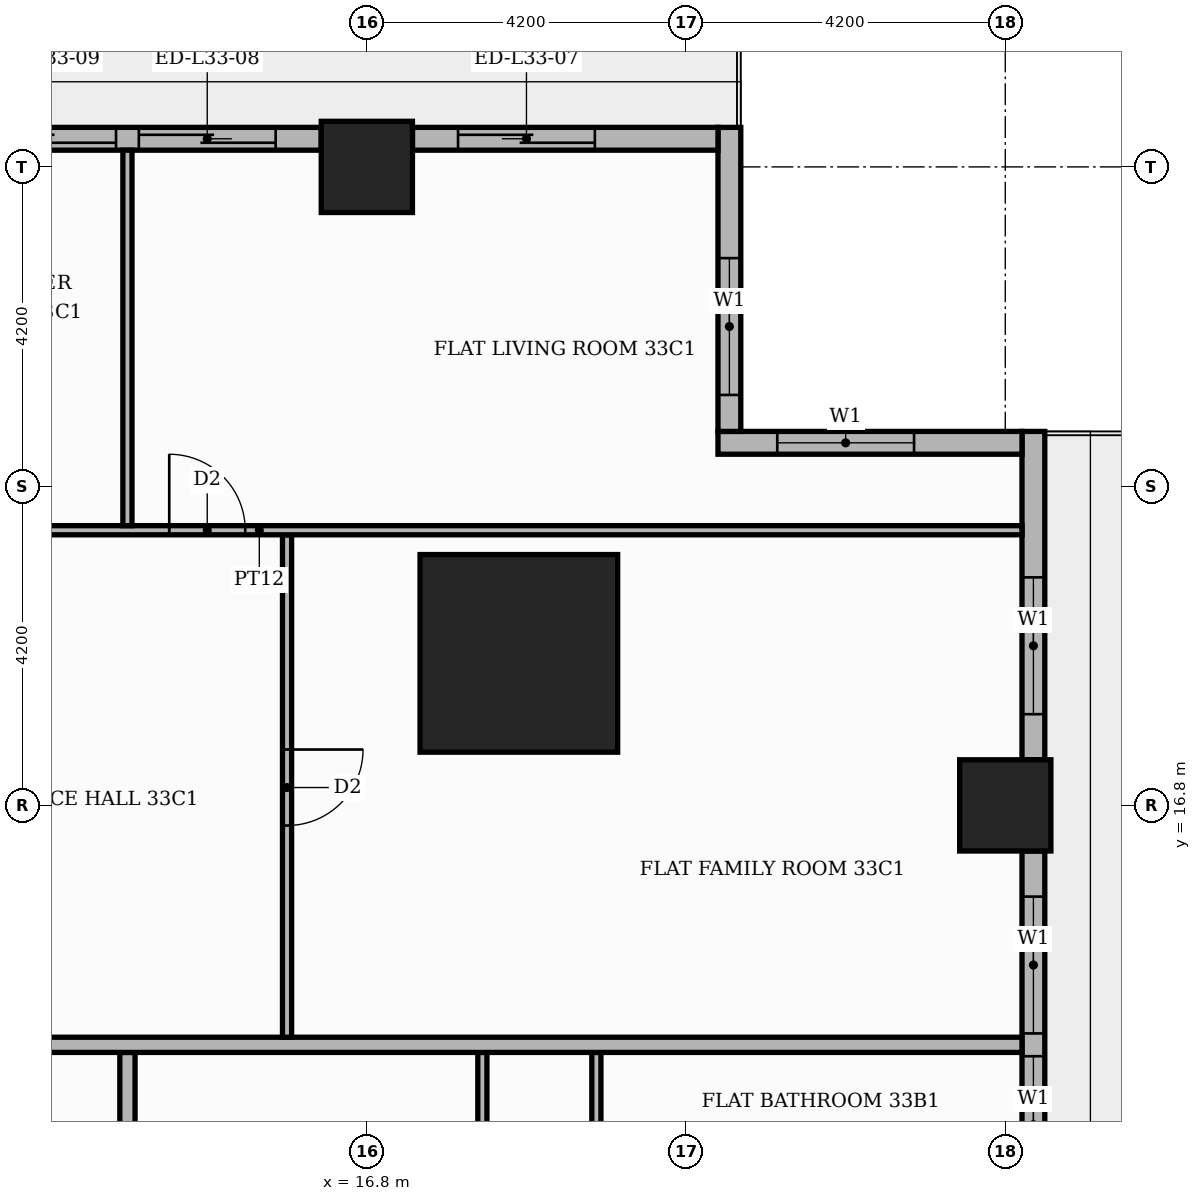
"""IFC4 building model, lengths in metres.
Left out: names, types, materials, properties, quantities, classifications, styles, units other than length and angle.
Written with IfcOpenShell. Run it as: python <this file> out.ifc"""

import sys

from ifc_helpers import new_model, si_unit, direction, frame, frame_2d, origin, origin_2d, place, context, subcontext, project, spatial, rectangle, extrude, element, fill, save


model = new_model("IFC4")
c1 = context("Model", 3, precision=1e-05, world=origin(), true_north=direction((0.0, 1.0)))
c2 = subcontext(c1, "Body", "Model", "MODEL_VIEW")
j1 = project(units=[si_unit("LENGTHUNIT", "METRE"), si_unit("PLANEANGLEUNIT", "RADIAN")], contexts=[c1])
p1 = place(None, origin())
s1 = spatial("IfcSite", under=j1, at=p1, CompositionType="ELEMENT")
p2 = place(p1, origin())
s2 = spatial("IfcBuilding", under=s1, at=p2, CompositionType="ELEMENT")
p3 = place(p2, frame((0.0, 0.0, 141.6)))
s3 = spatial("IfcBuildingStorey", under=s2, at=p3, CompositionType="ELEMENT", Elevation=141.6)
p4 = place(p3, frame((18.8, 18.8, 0.0), z_axis=(0.0, 0.0, 1.0), x_axis=(1.0, 0.0, 0.0)))
e1 = element("IfcColumn", 1, at=p4, inside=s3, PredefinedType="COLUMN", context=c2, shape_type="SweptSolid", body=[
    extrude(rectangle(XDim=2.6, YDim=2.6, at=origin_2d()), origin(), (0.0, 0.0, 1.0), 3.9),
])
for number, where, z_axis, x_axis in (
    (2, (25.2, 16.8, 0.0), (0.0, 0.0, 1.0), (1.0, 0.0, 0.0)),
    (3, (16.8, 25.2, 0.0), (0.0, 0.0, 1.0), (1.0, 0.0, 0.0)),
):
    element("IfcColumn", number, at=place(p3, frame(where, z_axis=z_axis, x_axis=x_axis)), inside=s3, PredefinedType="COLUMN", context=c2, shape_type="SweptSolid", body=[
        extrude(rectangle(XDim=1.2, YDim=1.2, at=origin_2d()), origin(), (0.0, 0.0, 1.0), 3.9),
    ])
p5 = place(p3, frame((25.57, 9.0, 0.0), z_axis=(0.0, 0.0, 1.0), x_axis=(0.0, 1.0, 0.0)))
e4 = element("IfcWall", 4, at=p5, inside=s3, PredefinedType="STANDARD", context=c2, shape_type="SweptSolid", body=[
    extrude(rectangle(XDim=7.2, YDim=0.3, at=frame_2d((3.6, 0.0))), origin(), (0.0, 0.0, 1.0), 3.48),
])
p6 = place(p5, frame((0.6, 0.0, 0.9)))
e5 = element("IfcOpeningElement", 5, at=p6, cuts=e4, PredefinedType="OPENING", context=c2, shape_type="SweptSolid", body=[
    extrude(rectangle(XDim=1.8, YDim=2.1, at=frame_2d((0.9, 1.05))), frame((0.0, 0.16, 0.0), z_axis=(0.0, -1.0, 0.0), x_axis=(1.0, 0.0, 0.0)), (0.0, 0.0, 1.0), 0.32),
])
p7 = place(p5, frame((2.7, 0.0, 0.9)))
e6 = element("IfcOpeningElement", 6, at=p7, cuts=e4, PredefinedType="OPENING", context=c2, shape_type="SweptSolid", body=[
    extrude(rectangle(XDim=1.8, YDim=2.1, at=frame_2d((0.9, 1.05))), frame((0.0, 0.16, 0.0), z_axis=(0.0, -1.0, 0.0), x_axis=(1.0, 0.0, 0.0)), (0.0, 0.0, 1.0), 0.32),
])
p8 = place(p5, frame((4.8, 0.0, 0.9)))
e7 = element("IfcOpeningElement", 7, at=p8, cuts=e4, PredefinedType="OPENING", context=c2, shape_type="SweptSolid", body=[
    extrude(rectangle(XDim=1.8, YDim=2.1, at=frame_2d((0.9, 1.05))), frame((0.0, 0.16, 0.0), z_axis=(0.0, -1.0, 0.0), x_axis=(1.0, 0.0, 0.0)), (0.0, 0.0, 1.0), 0.32),
])
p9 = place(p3, frame((25.57, 17.4, 0.0), z_axis=(0.0, 0.0, 1.0), x_axis=(0.0, 1.0, 0.0)))
e8 = element("IfcWall", 8, at=p9, inside=s3, PredefinedType="STANDARD", context=c2, shape_type="SweptSolid", body=[
    extrude(rectangle(XDim=4.32, YDim=0.3, at=frame_2d((2.16, 0.0))), origin(), (0.0, 0.0, 1.0), 3.48),
])
p10 = place(p9, frame((0.6, 0.0, 0.9)))
e9 = element("IfcOpeningElement", 9, at=p10, cuts=e8, PredefinedType="OPENING", context=c2, shape_type="SweptSolid", body=[
    extrude(rectangle(XDim=1.8, YDim=2.1, at=frame_2d((0.9, 1.05))), frame((0.0, 0.16, 0.0), z_axis=(0.0, -1.0, 0.0), x_axis=(1.0, 0.0, 0.0)), (0.0, 0.0, 1.0), 0.32),
])
p11 = place(p3, frame((25.42, 21.57, 0.0), z_axis=(0.0, 0.0, 1.0), x_axis=(-1.0, 0.0, 0.0)))
e10 = element("IfcWall", 10, at=p11, inside=s3, PredefinedType="STANDARD", context=c2, shape_type="SweptSolid", body=[
    extrude(rectangle(XDim=4.0, YDim=0.3, at=frame_2d((2.0, 0.0))), origin(), (0.0, 0.0, 1.0), 3.48),
])
p12 = place(p11, frame((1.42, 0.0, 0.9)))
e11 = element("IfcOpeningElement", 11, at=p12, cuts=e10, PredefinedType="OPENING", context=c2, shape_type="SweptSolid", body=[
    extrude(rectangle(XDim=1.8, YDim=2.1, at=frame_2d((0.9, 1.05))), frame((0.0, 0.16, 0.0), z_axis=(0.0, -1.0, 0.0), x_axis=(1.0, 0.0, 0.0)), (0.0, 0.0, 1.0), 0.32),
])
p13 = place(p3, frame((21.57, 21.72, 0.0), z_axis=(0.0, 0.0, 1.0), x_axis=(0.0, 1.0, 0.0)))
e12 = element("IfcWall", 12, at=p13, inside=s3, PredefinedType="STANDARD", context=c2, shape_type="SweptSolid", body=[
    extrude(rectangle(XDim=4.0, YDim=0.3, at=frame_2d((2.0, 0.0))), origin(), (0.0, 0.0, 1.0), 3.48),
])
p14 = place(p13, frame((0.48, 0.0, 0.9)))
e13 = element("IfcOpeningElement", 13, at=p14, cuts=e12, PredefinedType="OPENING", context=c2, shape_type="SweptSolid", body=[
    extrude(rectangle(XDim=1.8, YDim=2.1, at=frame_2d((0.9, 1.05))), frame((0.0, 0.16, 0.0), z_axis=(0.0, -1.0, 0.0), x_axis=(1.0, 0.0, 0.0)), (0.0, 0.0, 1.0), 0.32),
])
p15 = place(p3, frame((21.42, 25.57, 0.0), z_axis=(0.0, 0.0, 1.0), x_axis=(-1.0, 0.0, 0.0)))
e14 = element("IfcWall", 14, at=p15, inside=s3, PredefinedType="STANDARD", context=c2, shape_type="SweptSolid", body=[
    extrude(rectangle(XDim=4.02, YDim=0.3, at=frame_2d((2.01, 0.0))), origin(), (0.0, 0.0, 1.0), 3.48),
])
p16 = place(p15, frame((1.62, 0.0, 0.0)))
e15 = element("IfcOpeningElement", 15, at=p16, cuts=e14, PredefinedType="OPENING", context=c2, shape_type="SweptSolid", body=[
    extrude(rectangle(XDim=1.8, YDim=2.4, at=frame_2d((0.9, 1.2))), frame((0.0, 0.16, 0.0), z_axis=(0.0, -1.0, 0.0), x_axis=(1.0, 0.0, 0.0)), (0.0, 0.0, 1.0), 0.32),
])
p17 = place(p3, frame((16.2, 25.57, 0.0), z_axis=(0.0, 0.0, 1.0), x_axis=(-1.0, 0.0, 0.0)))
e16 = element("IfcWall", 16, at=p17, inside=s3, PredefinedType="STANDARD", context=c2, shape_type="SweptSolid", body=[
    extrude(rectangle(XDim=7.2, YDim=0.3, at=frame_2d((3.6, 0.0))), origin(), (0.0, 0.0, 1.0), 3.48),
])
p18 = place(p17, frame((0.6, 0.0, 0.0)))
e17 = element("IfcOpeningElement", 17, at=p18, cuts=e16, PredefinedType="OPENING", context=c2, shape_type="SweptSolid", body=[
    extrude(rectangle(XDim=1.8, YDim=2.4, at=frame_2d((0.9, 1.2))), frame((0.0, 0.16, 0.0), z_axis=(0.0, -1.0, 0.0), x_axis=(1.0, 0.0, 0.0)), (0.0, 0.0, 1.0), 0.32),
])
p19 = place(p17, frame((2.7, 0.0, 0.0)))
e18 = element("IfcOpeningElement", 18, at=p19, cuts=e16, PredefinedType="OPENING", context=c2, shape_type="SweptSolid", body=[
    extrude(rectangle(XDim=1.8, YDim=2.4, at=frame_2d((0.9, 1.2))), frame((0.0, 0.16, 0.0), z_axis=(0.0, -1.0, 0.0), x_axis=(1.0, 0.0, 0.0)), (0.0, 0.0, 1.0), 0.32),
])
p20 = place(p17, frame((4.8, 0.0, 0.9)))
e19 = element("IfcOpeningElement", 19, at=p20, cuts=e16, PredefinedType="OPENING", context=c2, shape_type="SweptSolid", body=[
    extrude(rectangle(XDim=1.8, YDim=2.1, at=frame_2d((0.9, 1.05))), frame((0.0, 0.16, 0.0), z_axis=(0.0, -1.0, 0.0), x_axis=(1.0, 0.0, 0.0)), (0.0, 0.0, 1.0), 0.32),
])
p21 = place(p3, frame((18.32, 9.66, 0.0), z_axis=(0.0, 0.0, 1.0), x_axis=(0.0, 1.0, 0.0)))
e20 = element("IfcWall", 20, at=p21, inside=s3, PredefinedType="PARTITIONING", context=c2, shape_type="SweptSolid", body=[
    extrude(rectangle(XDim=3.89, YDim=0.12, at=frame_2d((1.945, 0.0))), origin(), (0.0, 0.0, 1.0), 3.48),
])
p22 = place(p21, frame((1.515, 0.0, 0.0)))
e21 = element("IfcOpeningElement", 21, at=p22, cuts=e20, PredefinedType="OPENING", context=c2, shape_type="SweptSolid", body=[
    extrude(rectangle(XDim=0.9, YDim=2.1, at=frame_2d((0.45, 1.05))), frame((0.0, 0.07, 0.0), z_axis=(0.0, -1.0, 0.0), x_axis=(1.0, 0.0, 0.0)), (0.0, 0.0, 1.0), 0.14),
])
p23 = place(p3, frame((13.65, 11.1, 0.0), z_axis=(0.0, 0.0, 1.0), x_axis=(0.0, 1.0, 0.0)))
e22 = element("IfcWall", 22, at=p23, inside=s3, PredefinedType="PARTITIONING", context=c2, shape_type="SweptSolid", body=[
    extrude(rectangle(XDim=2.45, YDim=0.2, at=frame_2d((1.225, 0.0))), origin(), (0.0, 0.0, 1.0), 3.48),
])
p24 = place(p3, frame((19.82, 11.61, 0.0), z_axis=(0.0, 0.0, 1.0), x_axis=(0.0, 1.0, 0.0)))
e23 = element("IfcWall", 23, at=p24, inside=s3, PredefinedType="PARTITIONING", context=c2, shape_type="SweptSolid", body=[
    extrude(rectangle(XDim=1.94, YDim=0.12, at=frame_2d((0.97, 0.0))), origin(), (0.0, 0.0, 1.0), 3.48),
])
p25 = place(p3, frame((-13.65, 13.65, 0.0), z_axis=(0.0, 0.0, 1.0), x_axis=(1.0, 0.0, 0.0)))
e24 = element("IfcWall", 24, at=p25, inside=s3, PredefinedType="PARTITIONING", context=c2, shape_type="SweptSolid", body=[
    extrude(rectangle(XDim=39.07, YDim=0.2, at=frame_2d((19.535, 0.0))), origin(), (0.0, 0.0, 1.0), 3.48),
])
p26 = place(p25, frame((24.65, 0.0, 0.0)))
e25 = element("IfcOpeningElement", 25, at=p26, cuts=e24, PredefinedType="OPENING", context=c2, shape_type="SweptSolid", body=[
    extrude(rectangle(XDim=1.1, YDim=2.4, at=frame_2d((0.55, 1.2))), frame((0.0, 0.11, 0.0), z_axis=(0.0, -1.0, 0.0), x_axis=(1.0, 0.0, 0.0)), (0.0, 0.0, 1.0), 0.22),
])
p27 = place(p25, frame((12.05, 0.0, 0.0)))
e26 = element("IfcOpeningElement", 26, at=p27, cuts=e24, PredefinedType="OPENING", context=c2, shape_type="SweptSolid", body=[
    extrude(rectangle(XDim=1.1, YDim=2.4, at=frame_2d((0.55, 1.2))), frame((0.0, 0.11, 0.0), z_axis=(0.0, -1.0, 0.0), x_axis=(1.0, 0.0, 0.0)), (0.0, 0.0, 1.0), 0.22),
])
p28 = place(p3, frame((15.75, 13.75, 0.0), z_axis=(0.0, 0.0, 1.0), x_axis=(0.0, 1.0, 0.0)))
e27 = element("IfcWall", 27, at=p28, inside=s3, PredefinedType="PARTITIONING", context=c2, shape_type="SweptSolid", body=[
    extrude(rectangle(XDim=6.61, YDim=0.12, at=frame_2d((3.305, 0.0))), origin(), (0.0, 0.0, 1.0), 3.48),
])
p29 = place(p28, frame((2.785, 0.0, 0.0)))
e28 = element("IfcOpeningElement", 28, at=p29, cuts=e27, PredefinedType="OPENING", context=c2, shape_type="SweptSolid", body=[
    extrude(rectangle(XDim=1.0, YDim=2.1, at=frame_2d((0.5, 1.05))), frame((0.0, 0.07, 0.0), z_axis=(0.0, -1.0, 0.0), x_axis=(1.0, 0.0, 0.0)), (0.0, 0.0, 1.0), 0.14),
])
p30 = place(p3, frame((5.35, 20.42, 0.0), z_axis=(0.0, 0.0, 1.0), x_axis=(1.0, 0.0, 0.0)))
e29 = element("IfcWall", 29, at=p30, inside=s3, PredefinedType="PARTITIONING", context=c2, shape_type="SweptSolid", body=[
    extrude(rectangle(XDim=20.07, YDim=0.12, at=frame_2d((10.035, 0.0))), origin(), (0.0, 0.0, 1.0), 3.48),
])
p31 = place(p30, frame((8.85, 0.0, 0.0)))
e30 = element("IfcOpeningElement", 30, at=p31, cuts=e29, PredefinedType="OPENING", context=c2, shape_type="SweptSolid", body=[
    extrude(rectangle(XDim=1.0, YDim=2.1, at=frame_2d((0.5, 1.05))), frame((0.0, 0.07, 0.0), z_axis=(0.0, -1.0, 0.0), x_axis=(1.0, 0.0, 0.0)), (0.0, 0.0, 1.0), 0.14),
])
p32 = place(p30, frame((5.75, 0.0, 0.0)))
e31 = element("IfcOpeningElement", 31, at=p32, cuts=e29, PredefinedType="OPENING", context=c2, shape_type="SweptSolid", body=[
    extrude(rectangle(XDim=0.9, YDim=2.1, at=frame_2d((0.45, 1.05))), frame((0.0, 0.07, 0.0), z_axis=(0.0, -1.0, 0.0), x_axis=(1.0, 0.0, 0.0)), (0.0, 0.0, 1.0), 0.14),
])
p33 = place(p3, frame((13.65, 20.48, 0.0), z_axis=(0.0, 0.0, 1.0), x_axis=(0.0, 1.0, 0.0)))
e32 = element("IfcWall", 32, at=p33, inside=s3, PredefinedType="PARTITIONING", context=c2, shape_type="SweptSolid", body=[
    extrude(rectangle(XDim=4.94, YDim=0.12, at=frame_2d((2.47, 0.0))), origin(), (0.0, 0.0, 1.0), 3.48),
])
p34 = place(p7, origin())
e33 = element("IfcWindow", 33, at=p34, inside=s3, PartitioningType="SINGLE_PANEL", PredefinedType="WINDOW", context=c2, shape_type="SweptSolid", body=[
    extrude(rectangle(XDim=1.8, YDim=2.1, at=frame_2d((0.9, 1.05))), frame((0.0, 0.03, 0.0), z_axis=(0.0, -1.0, 0.0), x_axis=(1.0, 0.0, 0.0)), (0.0, 0.0, 1.0), 0.06),
])
fill(e6, e33)
p35 = place(p8, origin())
e34 = element("IfcWindow", 34, at=p35, inside=s3, PartitioningType="SINGLE_PANEL", PredefinedType="WINDOW", context=c2, shape_type="SweptSolid", body=[
    extrude(rectangle(XDim=1.8, YDim=2.1, at=frame_2d((0.9, 1.05))), frame((0.0, 0.03, 0.0), z_axis=(0.0, -1.0, 0.0), x_axis=(1.0, 0.0, 0.0)), (0.0, 0.0, 1.0), 0.06),
])
fill(e7, e34)
p36 = place(p10, origin())
e35 = element("IfcWindow", 35, at=p36, inside=s3, PartitioningType="SINGLE_PANEL", PredefinedType="WINDOW", context=c2, shape_type="SweptSolid", body=[
    extrude(rectangle(XDim=1.8, YDim=2.1, at=frame_2d((0.9, 1.05))), frame((0.0, 0.03, 0.0), z_axis=(0.0, -1.0, 0.0), x_axis=(1.0, 0.0, 0.0)), (0.0, 0.0, 1.0), 0.06),
])
fill(e9, e35)
p37 = place(p12, origin())
e36 = element("IfcWindow", 36, at=p37, inside=s3, PartitioningType="SINGLE_PANEL", PredefinedType="WINDOW", context=c2, shape_type="SweptSolid", body=[
    extrude(rectangle(XDim=1.8, YDim=2.1, at=frame_2d((0.9, 1.05))), frame((0.0, 0.03, 0.0), z_axis=(0.0, -1.0, 0.0), x_axis=(1.0, 0.0, 0.0)), (0.0, 0.0, 1.0), 0.06),
])
fill(e11, e36)
p38 = place(p14, origin())
e37 = element("IfcWindow", 37, at=p38, inside=s3, PartitioningType="SINGLE_PANEL", PredefinedType="WINDOW", context=c2, shape_type="SweptSolid", body=[
    extrude(rectangle(XDim=1.8, YDim=2.1, at=frame_2d((0.9, 1.05))), frame((0.0, 0.03, 0.0), z_axis=(0.0, -1.0, 0.0), x_axis=(1.0, 0.0, 0.0)), (0.0, 0.0, 1.0), 0.06),
])
fill(e13, e37)
p39 = place(p16, origin())
e38 = element("IfcDoor", 38, at=p39, inside=s3, OperationType="SLIDING_TO_RIGHT", PredefinedType="DOOR", context=c2, shape_type="SweptSolid", body=[
    extrude(rectangle(XDim=1.8, YDim=2.4, at=frame_2d((0.9, 1.2))), frame((0.0, 0.025, 0.0), z_axis=(0.0, -1.0, 0.0), x_axis=(1.0, 0.0, 0.0)), (0.0, 0.0, 1.0), 0.05),
])
fill(e15, e38)
p40 = place(p18, origin())
e39 = element("IfcDoor", 39, at=p40, inside=s3, OperationType="SLIDING_TO_LEFT", PredefinedType="DOOR", context=c2, shape_type="SweptSolid", body=[
    extrude(rectangle(XDim=1.8, YDim=2.4, at=frame_2d((0.9, 1.2))), frame((0.0, 0.025, 0.0), z_axis=(0.0, -1.0, 0.0), x_axis=(1.0, 0.0, 0.0)), (0.0, 0.0, 1.0), 0.05),
])
fill(e17, e39)
p41 = place(p19, origin())
e40 = element("IfcDoor", 40, at=p41, inside=s3, OperationType="SLIDING_TO_RIGHT", PredefinedType="DOOR", context=c2, shape_type="SweptSolid", body=[
    extrude(rectangle(XDim=1.8, YDim=2.4, at=frame_2d((0.9, 1.2))), frame((0.0, 0.025, 0.0), z_axis=(0.0, -1.0, 0.0), x_axis=(1.0, 0.0, 0.0)), (0.0, 0.0, 1.0), 0.05),
])
fill(e18, e40)
p42 = place(p29, frame((1.0, 0.0, 0.0), z_axis=(0.0, 0.0, 1.0), x_axis=(-1.0, 0.0, 0.0)))
e41 = element("IfcDoor", 41, at=p42, inside=s3, OperationType="SINGLE_SWING_RIGHT", PredefinedType="DOOR", context=c2, shape_type="SweptSolid", body=[
    extrude(rectangle(XDim=1.0, YDim=2.1, at=frame_2d((0.5, 1.05))), frame((0.0, 0.025, 0.0), z_axis=(0.0, -1.0, 0.0), x_axis=(1.0, 0.0, 0.0)), (0.0, 0.0, 1.0), 0.05),
])
fill(e28, e41)
p43 = place(p31, origin())
e42 = element("IfcDoor", 42, at=p43, inside=s3, OperationType="SINGLE_SWING_LEFT", PredefinedType="DOOR", context=c2, shape_type="SweptSolid", body=[
    extrude(rectangle(XDim=1.0, YDim=2.1, at=frame_2d((0.5, 1.05))), frame((0.0, 0.025, 0.0), z_axis=(0.0, -1.0, 0.0), x_axis=(1.0, 0.0, 0.0)), (0.0, 0.0, 1.0), 0.05),
])
fill(e30, e42)
save(model, sys.argv[1])
